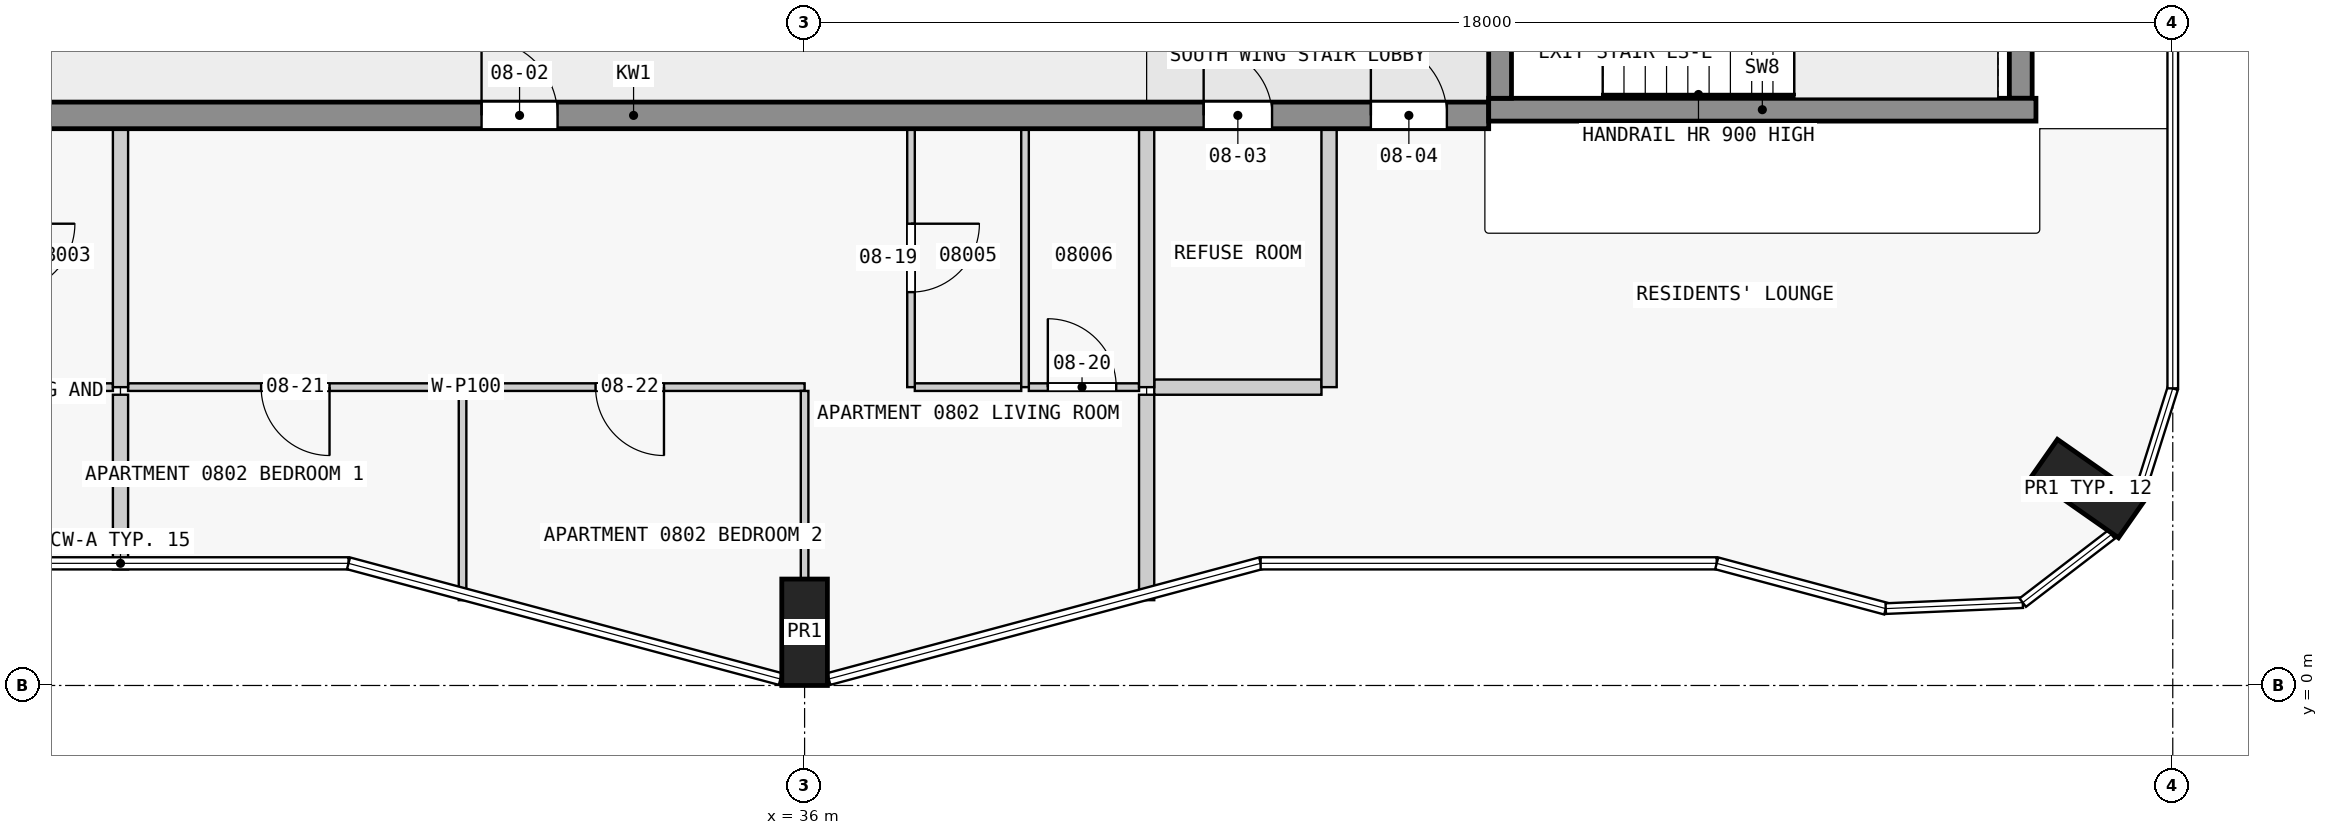
"""IFC4 building model, lengths in metres.
Left out: names, types, materials, properties, quantities, classifications, styles, units other than length and angle.
Written with IfcOpenShell. Run it as: python <this file> out.ifc"""

import sys

from ifc_helpers import new_model, si_unit, direction, frame, frame_2d, origin, origin_2d, place, context, subcontext, project, spatial, rectangle, extrude, element, fill, save


model = new_model("IFC4")
c1 = context("Model", 3, precision=1e-05, world=origin(), true_north=direction((0.0, 1.0)))
c2 = subcontext(c1, "Body", "Model", "MODEL_VIEW")
j1 = project(units=[si_unit("LENGTHUNIT", "METRE"), si_unit("PLANEANGLEUNIT", "RADIAN")], contexts=[c1])
p1 = place(None, origin())
s1 = spatial("IfcSite", under=j1, at=p1, CompositionType="ELEMENT")
p2 = place(p1, origin())
s2 = spatial("IfcBuilding", under=s1, at=p2, CompositionType="ELEMENT")
p3 = place(p2, frame((0.0, 0.0, 37.3)))
s3 = spatial("IfcBuildingStorey", under=s2, at=p3, CompositionType="ELEMENT", Elevation=37.3)
for number, where, z_axis, x_axis in (
    (1, (36.0, 0.7, 0.0), (0.0, 0.0, 1.0), (1.0, 0.0, 0.0)),
    (2, (52.884, 2.59, 0.0), (0.0, 0.0, 1.0), (0.574, 0.819, 0.0)),
):
    element("IfcColumn", number, at=place(p3, frame(where, z_axis=z_axis, x_axis=x_axis)), inside=s3, PredefinedType="COLUMN", context=c2, shape_type="SweptSolid", body=[
        extrude(rectangle(XDim=0.6, YDim=1.4, at=origin_2d()), origin(), (0.0, 0.0, 1.0), 3.5),
    ])
p4 = place(p3, frame((45.15, 7.725, 0.0), z_axis=(0.0, 0.0, 1.0), x_axis=(0.0, 1.0, 0.0)))
e3 = element("IfcWall", 3, at=p4, inside=s3, PredefinedType="SHEAR", context=c2, shape_type="SweptSolid", body=[
    extrude(rectangle(XDim=2.55, YDim=0.3, at=frame_2d((1.275, 0.0))), origin(), (0.0, 0.0, 1.0), 3.5),
])
p5 = place(p4, frame((0.725, 0.0, 0.0)))
e4 = element("IfcOpeningElement", 4, at=p5, cuts=e3, PredefinedType="OPENING", context=c2, shape_type="SweptSolid", body=[
    extrude(rectangle(XDim=1.1, YDim=2.1, at=frame_2d((0.55, 1.05))), frame((0.0, 0.16, 0.0), z_axis=(0.0, -1.0, 0.0), x_axis=(1.0, 0.0, 0.0)), (0.0, 0.0, 1.0), 0.32),
])
p6 = place(p3, frame((52.0, 7.725, 0.0), z_axis=(0.0, 0.0, 1.0), x_axis=(0.0, 1.0, 0.0)))
e5 = element("IfcWall", 5, at=p6, inside=s3, PredefinedType="SHEAR", context=c2, shape_type="SweptSolid", body=[
    extrude(rectangle(XDim=2.55, YDim=0.3, at=frame_2d((1.275, 0.0))), origin(), (0.0, 0.0, 1.0), 3.5),
])
p7 = place(p3, frame((45.0, 7.575, 0.0), z_axis=(0.0, 0.0, 1.0), x_axis=(1.0, 0.0, 0.0)))
e6 = element("IfcWall", 6, at=p7, inside=s3, PredefinedType="SHEAR", context=c2, shape_type="SweptSolid", body=[
    extrude(rectangle(XDim=7.2, YDim=0.3, at=frame_2d((3.6, 0.0))), origin(), (0.0, 0.0, 1.0), 3.5),
])
p8 = place(p3, frame((22.5, 7.5, 0.0), z_axis=(0.0, 0.0, 1.0), x_axis=(1.0, 0.0, 0.0)))
e7 = element("IfcWall", 7, at=p8, inside=s3, PredefinedType="SHEAR", context=c2, shape_type="SweptSolid", body=[
    extrude(rectangle(XDim=22.5, YDim=0.35, at=frame_2d((11.25, 0.0))), origin(), (0.0, 0.0, 1.0), 3.25),
])
p9 = place(p8, frame((1.75, 0.0, 0.0)))
e8 = element("IfcOpeningElement", 8, at=p9, cuts=e7, PredefinedType="OPENING", context=c2, shape_type="SweptSolid", body=[
    extrude(rectangle(XDim=1.0, YDim=2.1, at=frame_2d((0.5, 1.05))), frame((0.0, 0.185, 0.0), z_axis=(0.0, -1.0, 0.0), x_axis=(1.0, 0.0, 0.0)), (0.0, 0.0, 1.0), 0.37),
])
p10 = place(p8, frame((9.25, 0.0, 0.0)))
e9 = element("IfcOpeningElement", 9, at=p10, cuts=e7, PredefinedType="OPENING", context=c2, shape_type="SweptSolid", body=[
    extrude(rectangle(XDim=1.0, YDim=2.1, at=frame_2d((0.5, 1.05))), frame((0.0, 0.185, 0.0), z_axis=(0.0, -1.0, 0.0), x_axis=(1.0, 0.0, 0.0)), (0.0, 0.0, 1.0), 0.37),
])
p11 = place(p8, frame((18.75, 0.0, 0.0)))
e10 = element("IfcOpeningElement", 10, at=p11, cuts=e7, PredefinedType="OPENING", context=c2, shape_type="SweptSolid", body=[
    extrude(rectangle(XDim=0.9, YDim=2.1, at=frame_2d((0.45, 1.05))), frame((0.0, 0.185, 0.0), z_axis=(0.0, -1.0, 0.0), x_axis=(1.0, 0.0, 0.0)), (0.0, 0.0, 1.0), 0.37),
])
p12 = place(p8, frame((20.95, 0.0, 0.0)))
e11 = element("IfcOpeningElement", 11, at=p12, cuts=e7, PredefinedType="OPENING", context=c2, shape_type="SweptSolid", body=[
    extrude(rectangle(XDim=1.0, YDim=2.1, at=frame_2d((0.5, 1.05))), frame((0.0, 0.185, 0.0), z_axis=(0.0, -1.0, 0.0), x_axis=(1.0, 0.0, 0.0)), (0.0, 0.0, 1.0), 0.37),
])
p13 = place(p3, frame((36.0, 3.925, 0.0), z_axis=(0.0, 0.0, 1.0), x_axis=(-1.0, 0.0, 0.0)))
e12 = element("IfcWall", 12, at=p13, inside=s3, PredefinedType="PARTITIONING", context=c2, shape_type="SweptSolid", body=[
    extrude(rectangle(XDim=8.9, YDim=0.1, at=frame_2d((4.45, 0.0))), origin(), (0.0, 0.0, 1.0), 3.25),
])
p14 = place(p13, frame((6.25, 0.0, 0.0)))
e13 = element("IfcOpeningElement", 13, at=p14, cuts=e12, PredefinedType="OPENING", context=c2, shape_type="SweptSolid", body=[
    extrude(rectangle(XDim=0.9, YDim=2.1, at=frame_2d((0.45, 1.05))), frame((0.0, 0.06, 0.0), z_axis=(0.0, -1.0, 0.0), x_axis=(1.0, 0.0, 0.0)), (0.0, 0.0, 1.0), 0.12),
])
p15 = place(p13, frame((1.85, 0.0, 0.0)))
e14 = element("IfcOpeningElement", 14, at=p15, cuts=e12, PredefinedType="OPENING", context=c2, shape_type="SweptSolid", body=[
    extrude(rectangle(XDim=0.9, YDim=2.1, at=frame_2d((0.45, 1.05))), frame((0.0, 0.06, 0.0), z_axis=(0.0, -1.0, 0.0), x_axis=(1.0, 0.0, 0.0)), (0.0, 0.0, 1.0), 0.12),
])
p16 = place(p3, frame((25.55, 3.925, 0.0), z_axis=(0.0, 0.0, 1.0), x_axis=(1.0, 0.0, 0.0)))
e15 = element("IfcWall", 15, at=p16, inside=s3, PredefinedType="PARTITIONING", context=c2, shape_type="SweptSolid", body=[
    extrude(rectangle(XDim=1.35, YDim=0.1, at=frame_2d((0.675, 0.0))), origin(), (0.0, 0.0, 1.0), 3.25),
])
p17 = place(p3, frame((37.45, 3.925, 0.0), z_axis=(0.0, 0.0, 1.0), x_axis=(1.0, 0.0, 0.0)))
e16 = element("IfcWall", 16, at=p17, inside=s3, PredefinedType="PARTITIONING", context=c2, shape_type="SweptSolid", body=[
    extrude(rectangle(XDim=1.4, YDim=0.1, at=frame_2d((0.7, 0.0))), origin(), (0.0, 0.0, 1.0), 3.25),
])
p18 = place(p3, frame((38.95, 3.925, 0.0), z_axis=(0.0, 0.0, 1.0), x_axis=(1.0, 0.0, 0.0)))
e17 = element("IfcWall", 17, at=p18, inside=s3, PredefinedType="PARTITIONING", context=c2, shape_type="SweptSolid", body=[
    extrude(rectangle(XDim=1.45, YDim=0.1, at=frame_2d((0.725, 0.0))), origin(), (0.0, 0.0, 1.0), 3.25),
])
p19 = place(p18, frame((0.25, 0.0, 0.0)))
e18 = element("IfcOpeningElement", 18, at=p19, cuts=e17, PredefinedType="OPENING", context=c2, shape_type="SweptSolid", body=[
    extrude(rectangle(XDim=0.9, YDim=2.1, at=frame_2d((0.45, 1.05))), frame((0.0, 0.06, 0.0), z_axis=(0.0, -1.0, 0.0), x_axis=(1.0, 0.0, 0.0)), (0.0, 0.0, 1.0), 0.12),
])
p20 = place(p3, frame((40.6, 3.925, 0.0), z_axis=(0.0, 0.0, 1.0), x_axis=(1.0, 0.0, 0.0)))
e19 = element("IfcWall", 19, at=p20, inside=s3, PredefinedType="PARTITIONING", context=c2, shape_type="SweptSolid", body=[
    extrude(rectangle(XDim=2.2, YDim=0.2, at=frame_2d((1.1, 0.0))), origin(), (0.0, 0.0, 1.0), 3.25),
])
p21 = place(p3, frame((27.0, 3.825, 0.0), z_axis=(0.0, 0.0, 1.0), x_axis=(0.0, -1.0, 0.0)))
e20 = element("IfcWall", 20, at=p21, inside=s3, PredefinedType="PARTITIONING", context=c2, shape_type="SweptSolid", body=[
    extrude(rectangle(XDim=2.298, YDim=0.2, at=frame_2d((1.149, 0.0))), origin(), (0.0, 0.0, 1.0), 3.25),
])
p22 = place(p3, frame((27.0, 3.925, 0.0), z_axis=(0.0, 0.0, 1.0), x_axis=(0.0, 1.0, 0.0)))
e21 = element("IfcWall", 21, at=p22, inside=s3, PredefinedType="PARTITIONING", context=c2, shape_type="SweptSolid", body=[
    extrude(rectangle(XDim=3.4, YDim=0.2, at=frame_2d((1.7, 0.0))), origin(), (0.0, 0.0, 1.0), 3.25),
])
p23 = place(p3, frame((31.5, 1.122, 0.0), z_axis=(0.0, 0.0, 1.0), x_axis=(0.0, 1.0, 0.0)))
e22 = element("IfcWall", 22, at=p23, inside=s3, PredefinedType="PARTITIONING", context=c2, shape_type="SweptSolid", body=[
    extrude(rectangle(XDim=2.753, YDim=0.1, at=frame_2d((1.376, 0.0))), origin(), (0.0, 0.0, 1.0), 3.25),
])
p24 = place(p3, frame((36.0, 1.4, 0.0), z_axis=(0.0, 0.0, 1.0), x_axis=(0.0, 1.0, 0.0)))
e23 = element("IfcWall", 23, at=p24, inside=s3, PredefinedType="PARTITIONING", context=c2, shape_type="SweptSolid", body=[
    extrude(rectangle(XDim=2.475, YDim=0.1, at=frame_2d((1.238, 0.0))), origin(), (0.0, 0.0, 1.0), 3.25),
])
p25 = place(p3, frame((37.4, 7.325, 0.0), z_axis=(0.0, 0.0, 1.0), x_axis=(0.0, -1.0, 0.0)))
e24 = element("IfcWall", 24, at=p25, inside=s3, PredefinedType="PARTITIONING", context=c2, shape_type="SweptSolid", body=[
    extrude(rectangle(XDim=3.4, YDim=0.1, at=frame_2d((1.7, 0.0))), origin(), (0.0, 0.0, 1.0), 3.25),
])
p26 = place(p25, frame((1.25, 0.0, 0.0)))
e25 = element("IfcOpeningElement", 25, at=p26, cuts=e24, PredefinedType="OPENING", context=c2, shape_type="SweptSolid", body=[
    extrude(rectangle(XDim=0.9, YDim=2.1, at=frame_2d((0.45, 1.05))), frame((0.0, 0.06, 0.0), z_axis=(0.0, -1.0, 0.0), x_axis=(1.0, 0.0, 0.0)), (0.0, 0.0, 1.0), 0.12),
])
p27 = place(p3, frame((38.9, 3.925, 0.0), z_axis=(0.0, 0.0, 1.0), x_axis=(0.0, 1.0, 0.0)))
e26 = element("IfcWall", 26, at=p27, inside=s3, PredefinedType="PARTITIONING", context=c2, shape_type="SweptSolid", body=[
    extrude(rectangle(XDim=3.4, YDim=0.1, at=frame_2d((1.7, 0.0))), origin(), (0.0, 0.0, 1.0), 3.25),
])
p28 = place(p3, frame((40.5, 3.825, 0.0), z_axis=(0.0, 0.0, 1.0), x_axis=(0.0, -1.0, 0.0)))
e27 = element("IfcWall", 27, at=p28, inside=s3, PredefinedType="PARTITIONING", context=c2, shape_type="SweptSolid", body=[
    extrude(rectangle(XDim=2.703, YDim=0.2, at=frame_2d((1.351, 0.0))), origin(), (0.0, 0.0, 1.0), 3.25),
])
for number, where, z_axis, x_axis in (
    (28, (40.5, 3.925, 0.0), (0.0, 0.0, 1.0), (0.0, 1.0, 0.0)),
    (29, (42.9, 3.925, 0.0), (0.0, 0.0, 1.0), (0.0, 1.0, 0.0)),
):
    element("IfcWall", number, at=place(p3, frame(where, z_axis=z_axis, x_axis=x_axis)), inside=s3, PredefinedType="PARTITIONING", context=c2, shape_type="SweptSolid", body=[
        extrude(rectangle(XDim=3.4, YDim=0.2, at=frame_2d((1.7, 0.0))), origin(), (0.0, 0.0, 1.0), 3.25),
    ])
p29 = place(p10, origin())
e30 = element("IfcDoor", 30, at=p29, inside=s3, OperationType="SINGLE_SWING_LEFT", PredefinedType="DOOR", context=c2, shape_type="SweptSolid", body=[
    extrude(rectangle(XDim=1.0, YDim=2.1, at=frame_2d((0.5, 1.05))), frame((0.0, 0.025, 0.0), z_axis=(0.0, -1.0, 0.0), x_axis=(1.0, 0.0, 0.0)), (0.0, 0.0, 1.0), 0.05),
])
fill(e9, e30)
p30 = place(p11, origin())
e31 = element("IfcDoor", 31, at=p30, inside=s3, OperationType="SINGLE_SWING_RIGHT", PredefinedType="DOOR", context=c2, shape_type="SweptSolid", body=[
    extrude(rectangle(XDim=0.9, YDim=2.1, at=frame_2d((0.45, 1.05))), frame((0.0, 0.025, 0.0), z_axis=(0.0, -1.0, 0.0), x_axis=(1.0, 0.0, 0.0)), (0.0, 0.0, 1.0), 0.05),
])
fill(e10, e31)
p31 = place(p12, origin())
e32 = element("IfcDoor", 32, at=p31, inside=s3, OperationType="SINGLE_SWING_RIGHT", PredefinedType="DOOR", context=c2, shape_type="SweptSolid", body=[
    extrude(rectangle(XDim=1.0, YDim=2.1, at=frame_2d((0.5, 1.05))), frame((0.0, 0.025, 0.0), z_axis=(0.0, -1.0, 0.0), x_axis=(1.0, 0.0, 0.0)), (0.0, 0.0, 1.0), 0.05),
])
fill(e11, e32)
p32 = place(p26, origin())
e33 = element("IfcDoor", 33, at=p32, inside=s3, OperationType="SINGLE_SWING_LEFT", PredefinedType="DOOR", context=c2, shape_type="SweptSolid", body=[
    extrude(rectangle(XDim=0.9, YDim=2.1, at=frame_2d((0.45, 1.05))), frame((0.0, 0.025, 0.0), z_axis=(0.0, -1.0, 0.0), x_axis=(1.0, 0.0, 0.0)), (0.0, 0.0, 1.0), 0.05),
])
fill(e25, e33)
p33 = place(p19, origin())
e34 = element("IfcDoor", 34, at=p33, inside=s3, OperationType="SINGLE_SWING_LEFT", PredefinedType="DOOR", context=c2, shape_type="SweptSolid", body=[
    extrude(rectangle(XDim=0.9, YDim=2.1, at=frame_2d((0.45, 1.05))), frame((0.0, 0.025, 0.0), z_axis=(0.0, -1.0, 0.0), x_axis=(1.0, 0.0, 0.0)), (0.0, 0.0, 1.0), 0.05),
])
fill(e18, e34)
p34 = place(p14, origin())
e35 = element("IfcDoor", 35, at=p34, inside=s3, OperationType="SINGLE_SWING_RIGHT", PredefinedType="DOOR", context=c2, shape_type="SweptSolid", body=[
    extrude(rectangle(XDim=0.9, YDim=2.1, at=frame_2d((0.45, 1.05))), frame((0.0, 0.025, 0.0), z_axis=(0.0, -1.0, 0.0), x_axis=(1.0, 0.0, 0.0)), (0.0, 0.0, 1.0), 0.05),
])
fill(e13, e35)
p35 = place(p15, origin())
e36 = element("IfcDoor", 36, at=p35, inside=s3, OperationType="SINGLE_SWING_LEFT", PredefinedType="DOOR", context=c2, shape_type="SweptSolid", body=[
    extrude(rectangle(XDim=0.9, YDim=2.1, at=frame_2d((0.45, 1.05))), frame((0.0, 0.025, 0.0), z_axis=(0.0, -1.0, 0.0), x_axis=(1.0, 0.0, 0.0)), (0.0, 0.0, 1.0), 0.05),
])
fill(e14, e36)
save(model, sys.argv[1])
